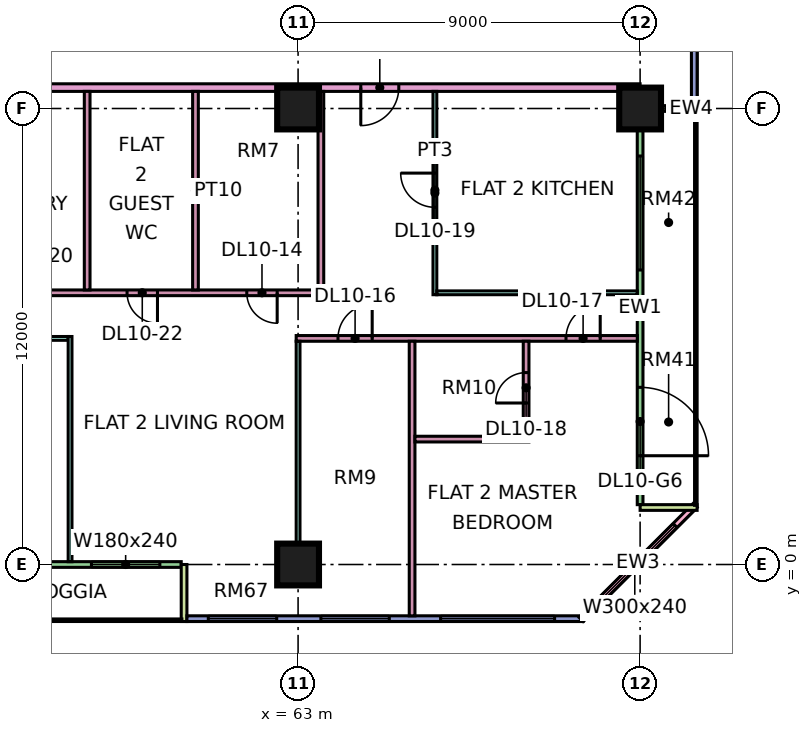
"""IFC4 building model, lengths in metres.
Left out: names, types, materials, properties, quantities, classifications, styles, units other than length and angle.
Written with IfcOpenShell. Run it as: python <this file> out.ifc"""

import sys

from ifc_helpers import new_model, si_unit, direction, frame, frame_2d, origin, origin_2d, place, context, subcontext, project, spatial, rectangle, extrude, element, fill, save


model = new_model("IFC4")
c1 = context("Model", 3, precision=1e-05, world=origin(), true_north=direction((0.0, 1.0)))
c2 = subcontext(c1, "Body", "Model", "MODEL_VIEW")
j1 = project(units=[si_unit("LENGTHUNIT", "METRE"), si_unit("PLANEANGLEUNIT", "RADIAN")], contexts=[c1])
p1 = place(None, origin())
s1 = spatial("IfcSite", under=j1, at=p1, CompositionType="ELEMENT")
p2 = place(p1, origin())
s2 = spatial("IfcBuilding", under=s1, at=p2, CompositionType="ELEMENT")
p3 = place(p2, frame((0.0, 0.0, 52.65)))
s3 = spatial("IfcBuildingStorey", under=s2, at=p3, CompositionType="ELEMENT", Elevation=52.65)
for number, where, z_axis, x_axis in (
    (1, (63.0, 0.0, 0.0), (0.0, 0.0, 1.0), (1.0, 0.0, 0.0)),
    (2, (63.0, 12.0, 0.0), (0.0, 0.0, 1.0), (1.0, 0.0, 0.0)),
    (3, (72.0, 12.0, 0.0), (0.0, 0.0, 1.0), (1.0, 0.0, 0.0)),
):
    element("IfcColumn", number, at=place(p3, frame(where, z_axis=z_axis, x_axis=x_axis)), inside=s3, PredefinedType="COLUMN", context=c2, shape_type="SweptSolid", body=[
        extrude(rectangle(XDim=1.1, YDim=1.1, at=origin_2d()), origin(), (0.0, 0.0, 1.0), 3.75),
    ])
p4 = place(p3, frame((48.075, 0.0, 0.0), z_axis=(0.0, 0.0, 1.0), x_axis=(1.0, 0.0, 0.0)))
e4 = element("IfcWall", 4, at=p4, inside=s3, PredefinedType="SOLIDWALL", context=c2, shape_type="SweptSolid", body=[
    extrude(rectangle(XDim=11.85, YDim=0.15, at=frame_2d((5.925, 0.0))), origin(), (0.0, 0.0, 1.0), 3.35),
])
p5 = place(p4, frame((0.562, 0.0, 0.45)))
e5 = element("IfcOpeningElement", 5, at=p5, cuts=e4, PredefinedType="OPENING", context=c2, shape_type="SweptSolid", body=[
    extrude(rectangle(XDim=1.8, YDim=2.4, at=frame_2d((0.9, 1.2))), frame((0.0, 0.085, 0.0), z_axis=(0.0, -1.0, 0.0), x_axis=(1.0, 0.0, 0.0)), (0.0, 0.0, 1.0), 0.17),
])
p6 = place(p4, frame((3.5, 0.0, 0.45)))
e6 = element("IfcOpeningElement", 6, at=p6, cuts=e4, PredefinedType="OPENING", context=c2, shape_type="SweptSolid", body=[
    extrude(rectangle(XDim=1.2, YDim=2.4, at=frame_2d((0.6, 1.2))), frame((0.0, 0.085, 0.0), z_axis=(0.0, -1.0, 0.0), x_axis=(1.0, 0.0, 0.0)), (0.0, 0.0, 1.0), 0.17),
])
p7 = place(p4, frame((7.15, 0.0, 0.45)))
e7 = element("IfcOpeningElement", 7, at=p7, cuts=e4, PredefinedType="OPENING", context=c2, shape_type="SweptSolid", body=[
    extrude(rectangle(XDim=1.2, YDim=2.4, at=frame_2d((0.6, 1.2))), frame((0.0, 0.085, 0.0), z_axis=(0.0, -1.0, 0.0), x_axis=(1.0, 0.0, 0.0)), (0.0, 0.0, 1.0), 0.17),
])
p8 = place(p4, frame((9.488, 0.0, 0.45)))
e8 = element("IfcOpeningElement", 8, at=p8, cuts=e4, PredefinedType="OPENING", context=c2, shape_type="SweptSolid", body=[
    extrude(rectangle(XDim=1.8, YDim=2.4, at=frame_2d((0.9, 1.2))), frame((0.0, 0.085, 0.0), z_axis=(0.0, -1.0, 0.0), x_axis=(1.0, 0.0, 0.0)), (0.0, 0.0, 1.0), 0.17),
])
p9 = place(p3, frame((60.0, -1.5, 0.0), z_axis=(0.0, 0.0, 1.0), x_axis=(0.0, 1.0, 0.0)))
e9 = element("IfcWall", 9, at=p9, inside=s3, PredefinedType="SOLIDWALL", context=c2, shape_type="SweptSolid", body=[
    extrude(rectangle(XDim=1.5, YDim=0.15, at=frame_2d((0.75, 0.0))), origin(), (0.0, 0.0, 1.0), 3.35),
])
p10 = place(p3, frame((60.075, -1.425, 0.0), z_axis=(0.0, 0.0, 1.0), x_axis=(1.0, 0.0, 0.0)))
e10 = element("IfcWall", 10, at=p10, inside=s3, PredefinedType="SOLIDWALL", context=c2, shape_type="SweptSolid", body=[
    extrude(rectangle(XDim=10.425, YDim=0.15, at=frame_2d((5.212, 0.0))), origin(), (0.0, 0.0, 1.0), 3.35),
])
p11 = place(p10, frame((0.562, 0.0, 0.45)))
e11 = element("IfcOpeningElement", 11, at=p11, cuts=e10, PredefinedType="OPENING", context=c2, shape_type="SweptSolid", body=[
    extrude(rectangle(XDim=1.8, YDim=2.4, at=frame_2d((0.9, 1.2))), frame((0.0, 0.085, 0.0), z_axis=(0.0, -1.0, 0.0), x_axis=(1.0, 0.0, 0.0)), (0.0, 0.0, 1.0), 0.17),
])
p12 = place(p10, frame((3.525, 0.0, 0.45)))
e12 = element("IfcOpeningElement", 12, at=p12, cuts=e10, PredefinedType="OPENING", context=c2, shape_type="SweptSolid", body=[
    extrude(rectangle(XDim=1.8, YDim=2.4, at=frame_2d((0.9, 1.2))), frame((0.0, 0.085, 0.0), z_axis=(0.0, -1.0, 0.0), x_axis=(1.0, 0.0, 0.0)), (0.0, 0.0, 1.0), 0.17),
])
p13 = place(p10, frame((6.675, 0.0, 0.45)))
e13 = element("IfcOpeningElement", 13, at=p13, cuts=e10, PredefinedType="OPENING", context=c2, shape_type="SweptSolid", body=[
    extrude(rectangle(XDim=3.0, YDim=2.4, at=frame_2d((1.5, 1.2))), frame((0.0, 0.085, 0.0), z_axis=(0.0, -1.0, 0.0), x_axis=(1.0, 0.0, 0.0)), (0.0, 0.0, 1.0), 0.17),
])
p14 = place(p3, frame((70.447, -1.447, 0.0), z_axis=(0.0, 0.0, 1.0), x_axis=(0.707106781187, 0.707106781187, 0.0)))
e14 = element("IfcWall", 14, at=p14, inside=s3, PredefinedType="SOLIDWALL", context=c2, shape_type="SweptSolid", body=[
    extrude(rectangle(XDim=4.243, YDim=0.15, at=frame_2d((2.121, 0.0))), origin(), (0.0, 0.0, 1.0), 3.35),
])
p15 = place(p14, frame((0.498, 0.0, 0.45)))
e15 = element("IfcOpeningElement", 15, at=p15, cuts=e14, PredefinedType="OPENING", context=c2, shape_type="SweptSolid", body=[
    extrude(rectangle(XDim=3.0, YDim=2.4, at=frame_2d((1.5, 1.2))), frame((0.0, 0.085, 0.0), z_axis=(0.0, -1.0, 0.0), x_axis=(1.0, 0.0, 0.0)), (0.0, 0.0, 1.0), 0.17),
])
p16 = place(p3, frame((72.0, 1.575, 0.0), z_axis=(0.0, 0.0, 1.0), x_axis=(0.0, 1.0, 0.0)))
e16 = element("IfcWall", 16, at=p16, inside=s3, PredefinedType="SOLIDWALL", context=c2, shape_type="SweptSolid", body=[
    extrude(rectangle(XDim=10.35, YDim=0.15, at=frame_2d((5.175, 0.0))), origin(), (0.0, 0.0, 1.0), 3.35),
])
p17 = place(p16, frame((1.288, 0.0, 0.0)))
e17 = element("IfcOpeningElement", 17, at=p17, cuts=e16, PredefinedType="OPENING", context=c2, shape_type="SweptSolid", body=[
    extrude(rectangle(XDim=1.8, YDim=2.4, at=frame_2d((0.9, 1.2))), frame((0.0, 0.085, 0.0), z_axis=(0.0, -1.0, 0.0), x_axis=(1.0, 0.0, 0.0)), (0.0, 0.0, 1.0), 0.17),
])
p18 = place(p16, frame((6.175, 0.0, 0.45)))
e18 = element("IfcOpeningElement", 18, at=p18, cuts=e16, PredefinedType="OPENING", context=c2, shape_type="SweptSolid", body=[
    extrude(rectangle(XDim=3.0, YDim=2.4, at=frame_2d((1.5, 1.2))), frame((0.0, 0.085, 0.0), z_axis=(0.0, -1.0, 0.0), x_axis=(1.0, 0.0, 0.0)), (0.0, 0.0, 1.0), 0.17),
])
for number, where, z_axis, x_axis in (
    (19, (73.5, 1.5, 0.0), (0.0, 0.0, 1.0), (-1.0, 0.0, 0.0)),
    (20, (73.5, 12.0, 0.0), (0.0, 0.0, 1.0), (-1.0, 0.0, 0.0)),
):
    element("IfcWall", number, at=place(p3, frame(where, z_axis=z_axis, x_axis=x_axis)), inside=s3, PredefinedType="SOLIDWALL", context=c2, shape_type="SweptSolid", body=[
        extrude(rectangle(XDim=1.5, YDim=0.15, at=frame_2d((0.75, 0.0))), origin(), (0.0, 0.0, 1.0), 3.35),
    ])
p19 = place(p3, frame((73.425, 12.075, 0.0), z_axis=(0.0, 0.0, 1.0), x_axis=(0.0, 1.0, 0.0)))
e21 = element("IfcWall", 21, at=p19, inside=s3, PredefinedType="SOLIDWALL", context=c2, shape_type="SweptSolid", body=[
    extrude(rectangle(XDim=10.425, YDim=0.15, at=frame_2d((5.212, 0.0))), origin(), (0.0, 0.0, 1.0), 3.35),
])
p20 = place(p19, frame((8.025, 0.0, 0.45)))
e22 = element("IfcOpeningElement", 22, at=p20, cuts=e21, PredefinedType="OPENING", context=c2, shape_type="SweptSolid", body=[
    extrude(rectangle(XDim=1.8, YDim=2.4, at=frame_2d((0.9, 1.2))), frame((0.0, 0.085, 0.0), z_axis=(0.0, -1.0, 0.0), x_axis=(1.0, 0.0, 0.0)), (0.0, 0.0, 1.0), 0.17),
])
p21 = place(p3, frame((40.65, 12.55, 0.0), z_axis=(0.0, 0.0, 1.0), x_axis=(1.0, 0.0, 0.0)))
e23 = element("IfcWall", 23, at=p21, inside=s3, PredefinedType="PARTITIONING", context=c2, shape_type="SweptSolid", body=[
    extrude(rectangle(XDim=31.35, YDim=0.2, at=frame_2d((15.675, 0.0))), origin(), (0.0, 0.0, 1.0), 3.35),
])
p22 = place(p21, frame((24.0, 0.0, 0.0)))
e24 = element("IfcOpeningElement", 24, at=p22, cuts=e23, PredefinedType="OPENING", context=c2, shape_type="SweptSolid", body=[
    extrude(rectangle(XDim=1.0, YDim=2.1, at=frame_2d((0.5, 1.05))), frame((0.0, 0.11, 0.0), z_axis=(0.0, -1.0, 0.0), x_axis=(1.0, 0.0, 0.0)), (0.0, 0.0, 1.0), 0.22),
])
p23 = place(p21, frame((1.05, 0.0, 0.0)))
e25 = element("IfcOpeningElement", 25, at=p23, cuts=e23, PredefinedType="OPENING", context=c2, shape_type="SweptSolid", body=[
    extrude(rectangle(XDim=1.0, YDim=2.1, at=frame_2d((0.5, 1.05))), frame((0.0, 0.11, 0.0), z_axis=(0.0, -1.0, 0.0), x_axis=(1.0, 0.0, 0.0)), (0.0, 0.0, 1.0), 0.22),
])
p24 = place(p3, frame((54.1, 5.95, 0.0), z_axis=(0.0, 0.0, 1.0), x_axis=(1.0, 0.0, 0.0)))
e26 = element("IfcWall", 26, at=p24, inside=s3, PredefinedType="PARTITIONING", context=c2, shape_type="SweptSolid", body=[
    extrude(rectangle(XDim=2.85, YDim=0.1, at=frame_2d((1.425, 0.0))), origin(), (0.0, 0.0, 1.0), 3.35),
])
p25 = place(p24, frame((0.95, 0.0, 0.0)))
e27 = element("IfcOpeningElement", 27, at=p25, cuts=e26, PredefinedType="OPENING", context=c2, shape_type="SweptSolid", body=[
    extrude(rectangle(XDim=0.9, YDim=2.1, at=frame_2d((0.45, 1.05))), frame((0.0, 0.06, 0.0), z_axis=(0.0, -1.0, 0.0), x_axis=(1.0, 0.0, 0.0)), (0.0, 0.0, 1.0), 0.12),
])
p26 = place(p3, frame((54.1, 7.15, 0.0), z_axis=(0.0, 0.0, 1.0), x_axis=(1.0, 0.0, 0.0)))
e28 = element("IfcWall", 28, at=p26, inside=s3, PredefinedType="PARTITIONING", context=c2, shape_type="SweptSolid", body=[
    extrude(rectangle(XDim=9.575, YDim=0.15, at=frame_2d((4.788, 0.0))), origin(), (0.0, 0.0, 1.0), 3.35),
])
p27 = place(p26, frame((7.55, 0.0, 0.0)))
e29 = element("IfcOpeningElement", 29, at=p27, cuts=e28, PredefinedType="OPENING", context=c2, shape_type="SweptSolid", body=[
    extrude(rectangle(XDim=0.8, YDim=2.1, at=frame_2d((0.4, 1.05))), frame((0.0, 0.085, 0.0), z_axis=(0.0, -1.0, 0.0), x_axis=(1.0, 0.0, 0.0)), (0.0, 0.0, 1.0), 0.17),
])
p28 = place(p26, frame((0.95, 0.0, 0.0)))
e30 = element("IfcOpeningElement", 30, at=p28, cuts=e28, PredefinedType="OPENING", context=c2, shape_type="SweptSolid", body=[
    extrude(rectangle(XDim=0.8, YDim=2.1, at=frame_2d((0.4, 1.05))), frame((0.0, 0.085, 0.0), z_axis=(0.0, -1.0, 0.0), x_axis=(1.0, 0.0, 0.0)), (0.0, 0.0, 1.0), 0.17),
])
p29 = place(p26, frame((4.4, 0.0, 0.0)))
e31 = element("IfcOpeningElement", 31, at=p29, cuts=e28, PredefinedType="OPENING", context=c2, shape_type="SweptSolid", body=[
    extrude(rectangle(XDim=0.8, YDim=2.1, at=frame_2d((0.4, 1.05))), frame((0.0, 0.085, 0.0), z_axis=(0.0, -1.0, 0.0), x_axis=(1.0, 0.0, 0.0)), (0.0, 0.0, 1.0), 0.17),
])
p30 = place(p3, frame((57.0, 0.074, 0.0), z_axis=(0.0, 0.0, 1.0), x_axis=(0.0, 1.0, 0.0)))
e32 = element("IfcWall", 32, at=p30, inside=s3, PredefinedType="PARTITIONING", context=c2, shape_type="SweptSolid", body=[
    extrude(rectangle(XDim=5.926, YDim=0.1, at=frame_2d((2.963, 0.0))), origin(), (0.0, 0.0, 1.0), 3.35),
])
for number, where, z_axis, x_axis in (
    (33, (57.45, 7.225, 0.0), (0.0, 0.0, 1.0), (0.0, 1.0, 0.0)),
    (34, (60.3, 7.225, 0.0), (0.0, 0.0, 1.0), (0.0, 1.0, 0.0)),
):
    element("IfcWall", number, at=place(p3, frame(where, z_axis=z_axis, x_axis=x_axis)), inside=s3, PredefinedType="PARTITIONING", context=c2, shape_type="SweptSolid", body=[
        extrude(rectangle(XDim=5.225, YDim=0.15, at=frame_2d((2.612, 0.0))), origin(), (0.0, 0.0, 1.0), 3.35),
    ])
p31 = place(p3, frame((62.95, 5.95, 0.0), z_axis=(0.0, 0.0, 1.0), x_axis=(1.0, 0.0, 0.0)))
e35 = element("IfcWall", 35, at=p31, inside=s3, PredefinedType="PARTITIONING", context=c2, shape_type="SweptSolid", body=[
    extrude(rectangle(XDim=8.976, YDim=0.15, at=frame_2d((4.488, 0.0))), origin(), (0.0, 0.0, 1.0), 3.35),
])
p32 = place(p31, frame((1.1, 0.0, 0.0)))
e36 = element("IfcOpeningElement", 36, at=p32, cuts=e35, PredefinedType="OPENING", context=c2, shape_type="SweptSolid", body=[
    extrude(rectangle(XDim=0.9, YDim=2.1, at=frame_2d((0.45, 1.05))), frame((0.0, 0.085, 0.0), z_axis=(0.0, -1.0, 0.0), x_axis=(1.0, 0.0, 0.0)), (0.0, 0.0, 1.0), 0.17),
])
p33 = place(p31, frame((7.1, 0.0, 0.0)))
e37 = element("IfcOpeningElement", 37, at=p33, cuts=e35, PredefinedType="OPENING", context=c2, shape_type="SweptSolid", body=[
    extrude(rectangle(XDim=0.9, YDim=2.1, at=frame_2d((0.45, 1.05))), frame((0.0, 0.085, 0.0), z_axis=(0.0, -1.0, 0.0), x_axis=(1.0, 0.0, 0.0)), (0.0, 0.0, 1.0), 0.17),
])
p34 = place(p3, frame((63.0, 0.0, 0.0), z_axis=(0.0, 0.0, 1.0), x_axis=(0.0, 1.0, 0.0)))
e38 = element("IfcWall", 38, at=p34, inside=s3, PredefinedType="PARTITIONING", context=c2, shape_type="SweptSolid", body=[
    extrude(rectangle(XDim=5.875, YDim=0.1, at=frame_2d((2.938, 0.0))), origin(), (0.0, 0.0, 1.0), 3.35),
])
p35 = place(p3, frame((63.6, 7.225, 0.0), z_axis=(0.0, 0.0, 1.0), x_axis=(0.0, 1.0, 0.0)))
e39 = element("IfcWall", 39, at=p35, inside=s3, PredefinedType="PARTITIONING", context=c2, shape_type="SweptSolid", body=[
    extrude(rectangle(XDim=5.225, YDim=0.15, at=frame_2d((2.612, 0.0))), origin(), (0.0, 0.0, 1.0), 3.35),
])
p36 = place(p3, frame((66.0, -1.351, 0.0), z_axis=(0.0, 0.0, 1.0), x_axis=(0.0, 1.0, 0.0)))
e40 = element("IfcWall", 40, at=p36, inside=s3, PredefinedType="PARTITIONING", context=c2, shape_type="SweptSolid", body=[
    extrude(rectangle(XDim=7.226, YDim=0.15, at=frame_2d((3.613, 0.0))), origin(), (0.0, 0.0, 1.0), 3.35),
])
p37 = place(p3, frame((66.075, 3.3, 0.0), z_axis=(0.0, 0.0, 1.0), x_axis=(1.0, 0.0, 0.0)))
e41 = element("IfcWall", 41, at=p37, inside=s3, PredefinedType="PARTITIONING", context=c2, shape_type="SweptSolid", body=[
    extrude(rectangle(XDim=3.0, YDim=0.15, at=frame_2d((1.5, 0.0))), origin(), (0.0, 0.0, 1.0), 3.35),
])
p38 = place(p3, frame((66.6, 7.1, 0.0), z_axis=(0.0, 0.0, 1.0), x_axis=(0.0, 1.0, 0.0)))
e42 = element("IfcWall", 42, at=p38, inside=s3, PredefinedType="PARTITIONING", context=c2, shape_type="SweptSolid", body=[
    extrude(rectangle(XDim=5.35, YDim=0.1, at=frame_2d((2.675, 0.0))), origin(), (0.0, 0.0, 1.0), 3.35),
])
p39 = place(p38, frame((2.3, 0.0, 0.0)))
e43 = element("IfcOpeningElement", 43, at=p39, cuts=e42, PredefinedType="OPENING", context=c2, shape_type="SweptSolid", body=[
    extrude(rectangle(XDim=0.9, YDim=2.1, at=frame_2d((0.45, 1.05))), frame((0.0, 0.06, 0.0), z_axis=(0.0, -1.0, 0.0), x_axis=(1.0, 0.0, 0.0)), (0.0, 0.0, 1.0), 0.12),
])
p40 = place(p3, frame((66.65, 7.15, 0.0), z_axis=(0.0, 0.0, 1.0), x_axis=(1.0, 0.0, 0.0)))
e44 = element("IfcWall", 44, at=p40, inside=s3, PredefinedType="PARTITIONING", context=c2, shape_type="SweptSolid", body=[
    extrude(rectangle(XDim=5.276, YDim=0.1, at=frame_2d((2.638, 0.0))), origin(), (0.0, 0.0, 1.0), 3.35),
])
p41 = place(p3, frame((69.0, 3.375, 0.0), z_axis=(0.0, 0.0, 1.0), x_axis=(0.0, 1.0, 0.0)))
e45 = element("IfcWall", 45, at=p41, inside=s3, PredefinedType="PARTITIONING", context=c2, shape_type="SweptSolid", body=[
    extrude(rectangle(XDim=2.5, YDim=0.15, at=frame_2d((1.25, 0.0))), origin(), (0.0, 0.0, 1.0), 3.35),
])
p42 = place(p41, frame((0.875, 0.0, 0.0)))
e46 = element("IfcOpeningElement", 46, at=p42, cuts=e45, PredefinedType="OPENING", context=c2, shape_type="SweptSolid", body=[
    extrude(rectangle(XDim=0.8, YDim=2.1, at=frame_2d((0.4, 1.05))), frame((0.0, 0.085, 0.0), z_axis=(0.0, -1.0, 0.0), x_axis=(1.0, 0.0, 0.0)), (0.0, 0.0, 1.0), 0.17),
])
p43 = place(p8, origin())
e47 = element("IfcWindow", 47, at=p43, inside=s3, PartitioningType="SINGLE_PANEL", PredefinedType="WINDOW", context=c2, shape_type="SweptSolid", body=[
    extrude(rectangle(XDim=1.8, YDim=2.4, at=frame_2d((0.9, 1.2))), frame((0.0, 0.03, 0.0), z_axis=(0.0, -1.0, 0.0), x_axis=(1.0, 0.0, 0.0)), (0.0, 0.0, 1.0), 0.06),
])
fill(e8, e47)
p44 = place(p11, origin())
e48 = element("IfcWindow", 48, at=p44, inside=s3, PartitioningType="SINGLE_PANEL", PredefinedType="WINDOW", context=c2, shape_type="SweptSolid", body=[
    extrude(rectangle(XDim=1.8, YDim=2.4, at=frame_2d((0.9, 1.2))), frame((0.0, 0.03, 0.0), z_axis=(0.0, -1.0, 0.0), x_axis=(1.0, 0.0, 0.0)), (0.0, 0.0, 1.0), 0.06),
])
fill(e11, e48)
p45 = place(p12, origin())
e49 = element("IfcWindow", 49, at=p45, inside=s3, PartitioningType="SINGLE_PANEL", PredefinedType="WINDOW", context=c2, shape_type="SweptSolid", body=[
    extrude(rectangle(XDim=1.8, YDim=2.4, at=frame_2d((0.9, 1.2))), frame((0.0, 0.03, 0.0), z_axis=(0.0, -1.0, 0.0), x_axis=(1.0, 0.0, 0.0)), (0.0, 0.0, 1.0), 0.06),
])
fill(e12, e49)
p46 = place(p13, origin())
e50 = element("IfcWindow", 50, at=p46, inside=s3, PartitioningType="SINGLE_PANEL", PredefinedType="WINDOW", context=c2, shape_type="SweptSolid", body=[
    extrude(rectangle(XDim=3.0, YDim=2.4, at=frame_2d((1.5, 1.2))), frame((0.0, 0.03, 0.0), z_axis=(0.0, -1.0, 0.0), x_axis=(1.0, 0.0, 0.0)), (0.0, 0.0, 1.0), 0.06),
])
fill(e13, e50)
p47 = place(p15, origin())
e51 = element("IfcWindow", 51, at=p47, inside=s3, PartitioningType="SINGLE_PANEL", PredefinedType="WINDOW", context=c2, shape_type="SweptSolid", body=[
    extrude(rectangle(XDim=3.0, YDim=2.4, at=frame_2d((1.5, 1.2))), frame((0.0, 0.03, 0.0), z_axis=(0.0, -1.0, 0.0), x_axis=(1.0, 0.0, 0.0)), (0.0, 0.0, 1.0), 0.06),
])
fill(e15, e51)
p48 = place(p17, frame((1.8, 0.0, 0.0), z_axis=(0.0, 0.0, 1.0), x_axis=(-1.0, 0.0, 0.0)))
e52 = element("IfcDoor", 52, at=p48, inside=s3, OperationType="DOUBLE_DOOR_SINGLE_SWING", PredefinedType="DOOR", context=c2, shape_type="SweptSolid", body=[
    extrude(rectangle(XDim=1.8, YDim=2.4, at=frame_2d((0.9, 1.2))), frame((0.0, 0.025, 0.0), z_axis=(0.0, -1.0, 0.0), x_axis=(1.0, 0.0, 0.0)), (0.0, 0.0, 1.0), 0.05),
])
fill(e17, e52)
p49 = place(p18, origin())
e53 = element("IfcWindow", 53, at=p49, inside=s3, PartitioningType="SINGLE_PANEL", PredefinedType="WINDOW", context=c2, shape_type="SweptSolid", body=[
    extrude(rectangle(XDim=3.0, YDim=2.4, at=frame_2d((1.5, 1.2))), frame((0.0, 0.03, 0.0), z_axis=(0.0, -1.0, 0.0), x_axis=(1.0, 0.0, 0.0)), (0.0, 0.0, 1.0), 0.06),
])
fill(e18, e53)
p50 = place(p27, origin())
e54 = element("IfcDoor", 54, at=p50, inside=s3, OperationType="SINGLE_SWING_RIGHT", PredefinedType="DOOR", context=c2, shape_type="SweptSolid", body=[
    extrude(rectangle(XDim=0.8, YDim=2.1, at=frame_2d((0.4, 1.05))), frame((0.0, 0.025, 0.0), z_axis=(0.0, -1.0, 0.0), x_axis=(1.0, 0.0, 0.0)), (0.0, 0.0, 1.0), 0.05),
])
fill(e29, e54)
p51 = place(p32, frame((0.9, 0.0, 0.0), z_axis=(0.0, 0.0, 1.0), x_axis=(-1.0, 0.0, 0.0)))
e55 = element("IfcDoor", 55, at=p51, inside=s3, OperationType="SINGLE_SWING_RIGHT", PredefinedType="DOOR", context=c2, shape_type="SweptSolid", body=[
    extrude(rectangle(XDim=0.9, YDim=2.1, at=frame_2d((0.45, 1.05))), frame((0.0, 0.025, 0.0), z_axis=(0.0, -1.0, 0.0), x_axis=(1.0, 0.0, 0.0)), (0.0, 0.0, 1.0), 0.05),
])
fill(e36, e55)
p52 = place(p33, frame((0.9, 0.0, 0.0), z_axis=(0.0, 0.0, 1.0), x_axis=(-1.0, 0.0, 0.0)))
e56 = element("IfcDoor", 56, at=p52, inside=s3, OperationType="SINGLE_SWING_RIGHT", PredefinedType="DOOR", context=c2, shape_type="SweptSolid", body=[
    extrude(rectangle(XDim=0.9, YDim=2.1, at=frame_2d((0.45, 1.05))), frame((0.0, 0.025, 0.0), z_axis=(0.0, -1.0, 0.0), x_axis=(1.0, 0.0, 0.0)), (0.0, 0.0, 1.0), 0.05),
])
fill(e37, e56)
p53 = place(p42, origin())
e57 = element("IfcDoor", 57, at=p53, inside=s3, OperationType="SINGLE_SWING_LEFT", PredefinedType="DOOR", context=c2, shape_type="SweptSolid", body=[
    extrude(rectangle(XDim=0.8, YDim=2.1, at=frame_2d((0.4, 1.05))), frame((0.0, 0.025, 0.0), z_axis=(0.0, -1.0, 0.0), x_axis=(1.0, 0.0, 0.0)), (0.0, 0.0, 1.0), 0.05),
])
fill(e46, e57)
p54 = place(p39, frame((0.9, 0.0, 0.0), z_axis=(0.0, 0.0, 1.0), x_axis=(-1.0, 0.0, 0.0)))
e58 = element("IfcDoor", 58, at=p54, inside=s3, OperationType="SINGLE_SWING_RIGHT", PredefinedType="DOOR", context=c2, shape_type="SweptSolid", body=[
    extrude(rectangle(XDim=0.9, YDim=2.1, at=frame_2d((0.45, 1.05))), frame((0.0, 0.025, 0.0), z_axis=(0.0, -1.0, 0.0), x_axis=(1.0, 0.0, 0.0)), (0.0, 0.0, 1.0), 0.05),
])
fill(e43, e58)
p55 = place(p22, frame((1.0, 0.0, 0.0), z_axis=(0.0, 0.0, 1.0), x_axis=(-1.0, 0.0, 0.0)))
e59 = element("IfcDoor", 59, at=p55, inside=s3, OperationType="SINGLE_SWING_LEFT", PredefinedType="DOOR", context=c2, shape_type="SweptSolid", body=[
    extrude(rectangle(XDim=1.0, YDim=2.1, at=frame_2d((0.5, 1.05))), frame((0.0, 0.025, 0.0), z_axis=(0.0, -1.0, 0.0), x_axis=(1.0, 0.0, 0.0)), (0.0, 0.0, 1.0), 0.05),
])
fill(e24, e59)
p56 = place(p29, origin())
e60 = element("IfcDoor", 60, at=p56, inside=s3, OperationType="SINGLE_SWING_RIGHT", PredefinedType="DOOR", context=c2, shape_type="SweptSolid", body=[
    extrude(rectangle(XDim=0.8, YDim=2.1, at=frame_2d((0.4, 1.05))), frame((0.0, 0.025, 0.0), z_axis=(0.0, -1.0, 0.0), x_axis=(1.0, 0.0, 0.0)), (0.0, 0.0, 1.0), 0.05),
])
fill(e31, e60)
save(model, sys.argv[1])
